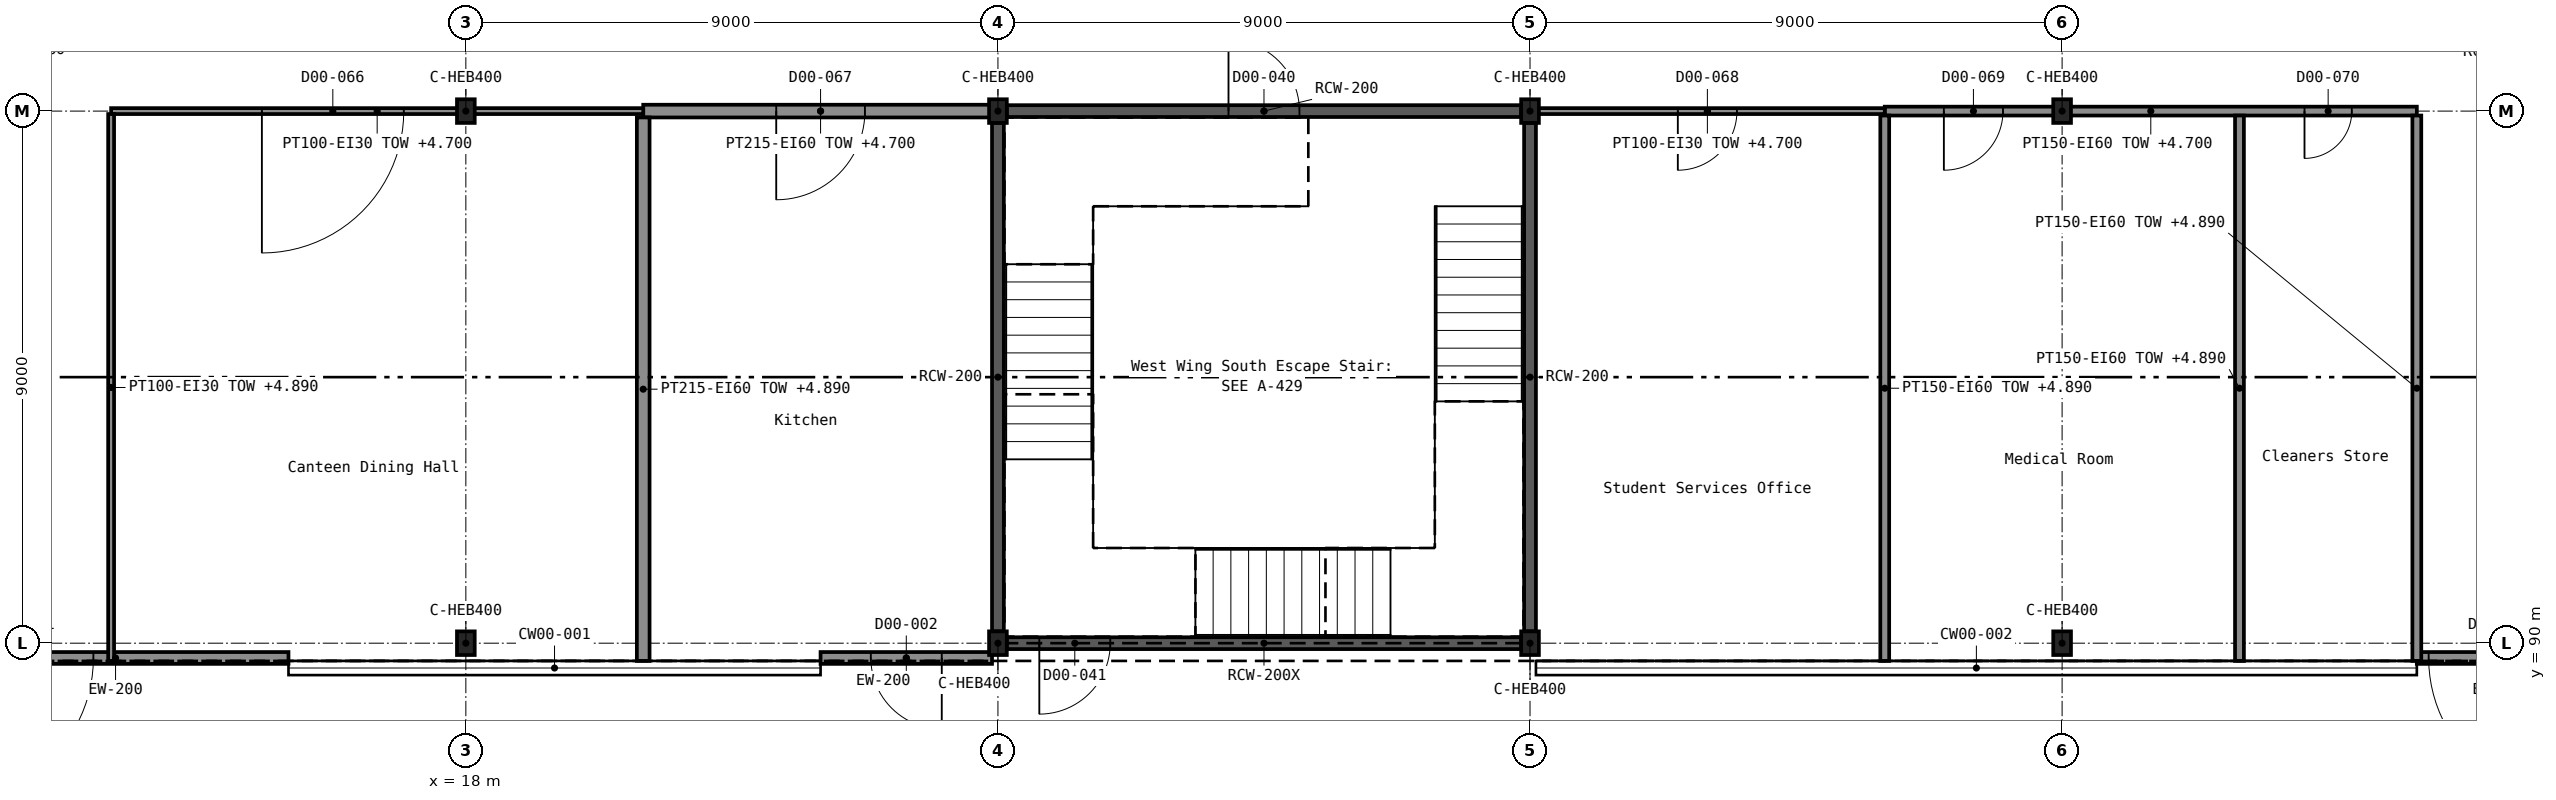
"""IFC4 building model, lengths in metres.
Left out: names, types, materials, properties, quantities, classifications, styles, units other than length and angle.
Written with IfcOpenShell. Run it as: python <this file> out.ifc"""

import sys

from ifc_helpers import new_model, si_unit, direction, frame, frame_2d, origin, origin_2d, place, context, subcontext, project, spatial, rectangle, i_section, extrude, element, fill, save


model = new_model("IFC4")
c1 = context("Model", 3, precision=1e-05, world=origin(), true_north=direction((0.0, 1.0)))
c2 = subcontext(c1, "Body", "Model", "MODEL_VIEW")
j1 = project(units=[si_unit("LENGTHUNIT", "METRE"), si_unit("PLANEANGLEUNIT", "RADIAN")], contexts=[c1])
p1 = place(None, origin())
s1 = spatial("IfcSite", under=j1, at=p1, CompositionType="ELEMENT")
p2 = place(p1, origin())
s2 = spatial("IfcBuilding", under=s1, at=p2, CompositionType="ELEMENT")
p3 = place(p2, origin())
s3 = spatial("IfcBuildingStorey", under=s2, at=p3, CompositionType="ELEMENT", Elevation=0.0)
for number, where, z_axis, x_axis in (
    (1, (18.0, 90.0, -0.3), (0.0, 0.0, 1.0), (1.0, 0.0, 0.0)),
    (2, (27.0, 90.0, -0.3), (0.0, 0.0, 1.0), (1.0, 0.0, 0.0)),
    (3, (36.0, 90.0, -0.3), (0.0, 0.0, 1.0), (1.0, 0.0, 0.0)),
    (4, (45.0, 90.0, -0.3), (0.0, 0.0, 1.0), (1.0, 0.0, 0.0)),
    (5, (18.0, 99.0, -0.3), (0.0, 0.0, 1.0), (1.0, 0.0, 0.0)),
    (6, (27.0, 99.0, -0.3), (0.0, 0.0, 1.0), (1.0, 0.0, 0.0)),
    (7, (36.0, 99.0, -0.3), (0.0, 0.0, 1.0), (1.0, 0.0, 0.0)),
    (8, (45.0, 99.0, -0.3), (0.0, 0.0, 1.0), (1.0, 0.0, 0.0)),
):
    element("IfcColumn", number, at=place(p3, frame(where, z_axis=z_axis, x_axis=x_axis)), inside=s3, PredefinedType="COLUMN", context=c2, shape_type="SweptSolid", body=[
        extrude(i_section(OverallWidth=0.3, OverallDepth=0.4, WebThickness=0.013, FlangeThickness=0.024, FilletRadius=0.027, at=origin_2d()), origin(), (0.0, 0.0, 1.0), 5.7),
    ])
p4 = place(p3, frame((9.15, 89.75, 0.0), z_axis=(0.0, 0.0, 1.0), x_axis=(1.0, 0.0, 0.0)))
e9 = element("IfcWall", 9, at=p4, inside=s3, PredefinedType="SOLIDWALL", context=c2, shape_type="SweptSolid", body=[
    extrude(rectangle(XDim=5.85, YDim=0.2, at=frame_2d((2.925, 0.0))), origin(), (0.0, 0.0, 1.0), 5.4),
])
p5 = place(p4, frame((0.15, 0.0, 0.0)))
e10 = element("IfcOpeningElement", 10, at=p5, cuts=e9, PredefinedType="OPENING", context=c2, shape_type="SweptSolid", body=[
    extrude(rectangle(XDim=2.4, YDim=2.4, at=frame_2d((1.2, 1.2))), frame((0.0, 0.111, 0.0), z_axis=(0.0, -1.0, 0.0), x_axis=(1.0, 0.0, 0.0)), (0.0, 0.0, 1.0), 0.222),
])
p6 = place(p3, frame((24.0, 89.75, 0.0), z_axis=(0.0, 0.0, 1.0), x_axis=(1.0, 0.0, 0.0)))
e11 = element("IfcWall", 11, at=p6, inside=s3, PredefinedType="SOLIDWALL", context=c2, shape_type="SweptSolid", body=[
    extrude(rectangle(XDim=2.9, YDim=0.2, at=frame_2d((1.45, 0.0))), origin(), (0.0, 0.0, 1.0), 5.4),
])
p7 = place(p6, frame((0.85, 0.0, 0.0)))
e12 = element("IfcOpeningElement", 12, at=p7, cuts=e11, PredefinedType="OPENING", context=c2, shape_type="SweptSolid", body=[
    extrude(rectangle(XDim=1.2, YDim=2.1, at=frame_2d((0.6, 1.05))), frame((0.0, 0.111, 0.0), z_axis=(0.0, -1.0, 0.0), x_axis=(1.0, 0.0, 0.0)), (0.0, 0.0, 1.0), 0.222),
])
p8 = place(p3, frame((51.0, 89.75, 0.0), z_axis=(0.0, 0.0, 1.0), x_axis=(1.0, 0.0, 0.0)))
e13 = element("IfcWall", 13, at=p8, inside=s3, PredefinedType="SOLIDWALL", context=c2, shape_type="SweptSolid", body=[
    extrude(rectangle(XDim=2.8, YDim=0.2, at=frame_2d((1.4, 0.0))), origin(), (0.0, 0.0, 1.0), 5.4),
])
p9 = place(p8, frame((0.2, 0.0, 0.0)))
e14 = element("IfcOpeningElement", 14, at=p9, cuts=e13, PredefinedType="OPENING", context=c2, shape_type="SweptSolid", body=[
    extrude(rectangle(XDim=2.4, YDim=2.4, at=frame_2d((1.2, 1.2))), frame((0.0, 0.111, 0.0), z_axis=(0.0, -1.0, 0.0), x_axis=(1.0, 0.0, 0.0)), (0.0, 0.0, 1.0), 0.222),
])
p10 = place(p3, frame((27.15, 90.0, 0.0), z_axis=(0.0, 0.0, 1.0), x_axis=(1.0, 0.0, 0.0)))
e15 = element("IfcWall", 15, at=p10, inside=s3, PredefinedType="SHEAR", context=c2, shape_type="SweptSolid", body=[
    extrude(rectangle(XDim=8.7, YDim=0.2, at=frame_2d((4.35, 0.0))), origin(), (0.0, 0.0, 1.0), 5.4),
])
p11 = place(p10, frame((0.55, 0.0, 0.0)))
e16 = element("IfcOpeningElement", 16, at=p11, cuts=e15, PredefinedType="OPENING", context=c2, shape_type="SweptSolid", body=[
    extrude(rectangle(XDim=1.2, YDim=2.1, at=frame_2d((0.6, 1.05))), frame((0.0, 0.111, 0.0), z_axis=(0.0, -1.0, 0.0), x_axis=(1.0, 0.0, 0.0)), (0.0, 0.0, 1.0), 0.222),
])
p12 = place(p3, frame((27.15, 99.0, 0.0), z_axis=(0.0, 0.0, 1.0), x_axis=(1.0, 0.0, 0.0)))
e17 = element("IfcWall", 17, at=p12, inside=s3, PredefinedType="SHEAR", context=c2, shape_type="SweptSolid", body=[
    extrude(rectangle(XDim=8.7, YDim=0.2, at=frame_2d((4.35, 0.0))), origin(), (0.0, 0.0, 1.0), 5.4),
])
p13 = place(p12, frame((3.75, 0.0, 0.0)))
e18 = element("IfcOpeningElement", 18, at=p13, cuts=e17, PredefinedType="OPENING", context=c2, shape_type="SweptSolid", body=[
    extrude(rectangle(XDim=1.2, YDim=2.1, at=frame_2d((0.6, 1.05))), frame((0.0, 0.111, 0.0), z_axis=(0.0, -1.0, 0.0), x_axis=(1.0, 0.0, 0.0)), (0.0, 0.0, 1.0), 0.222),
])
for number, where, z_axis, x_axis in (
    (19, (27.0, 90.2, 0.0), (0.0, 0.0, 1.0), (0.0, 1.0, 0.0)),
    (20, (36.0, 90.2, 0.0), (0.0, 0.0, 1.0), (0.0, 1.0, 0.0)),
):
    element("IfcWall", number, at=place(p3, frame(where, z_axis=z_axis, x_axis=x_axis)), inside=s3, PredefinedType="SHEAR", context=c2, shape_type="SweptSolid", body=[
        extrude(rectangle(XDim=8.6, YDim=0.2, at=frame_2d((4.3, 0.0))), origin(), (0.0, 0.0, 1.0), 5.4),
    ])
p14 = place(p3, frame((21.0, 99.0, 0.0), z_axis=(0.0, 0.0, 1.0), x_axis=(1.0, 0.0, 0.0)))
e21 = element("IfcWall", 21, at=p14, inside=s3, PredefinedType="PARTITIONING", context=c2, shape_type="SweptSolid", body=[
    extrude(rectangle(XDim=6.0, YDim=0.215, at=frame_2d((3.0, 0.0))), origin(), (0.0, 0.0, 1.0), 4.7),
])
p15 = place(p14, frame((2.25, 0.0, 0.0)))
e22 = element("IfcOpeningElement", 22, at=p15, cuts=e21, PredefinedType="OPENING", context=c2, shape_type="SweptSolid", body=[
    extrude(rectangle(XDim=1.5, YDim=2.1, at=frame_2d((0.75, 1.05))), frame((0.0, 0.119, 0.0), z_axis=(0.0, -1.0, 0.0), x_axis=(1.0, 0.0, 0.0)), (0.0, 0.0, 1.0), 0.237),
])
p16 = place(p3, frame((21.0, 89.7, 0.0), z_axis=(0.0, 0.0, 1.0), x_axis=(0.0, 1.0, 0.0)))
e23 = element("IfcWall", 23, at=p16, inside=s3, PredefinedType="PARTITIONING", context=c2, shape_type="SweptSolid", body=[
    extrude(rectangle(XDim=9.193, YDim=0.215, at=frame_2d((4.596, 0.0))), origin(), (0.0, 0.0, 1.0), 4.89),
])
p17 = place(p3, frame((42.0, 99.0, 0.0), z_axis=(0.0, 0.0, 1.0), x_axis=(1.0, 0.0, 0.0)))
e24 = element("IfcWall", 24, at=p17, inside=s3, PredefinedType="PARTITIONING", context=c2, shape_type="SweptSolid", body=[
    extrude(rectangle(XDim=9.0, YDim=0.15, at=frame_2d((4.5, 0.0))), origin(), (0.0, 0.0, 1.0), 4.7),
])
p18 = place(p17, frame((1.0, 0.0, 0.0)))
e25 = element("IfcOpeningElement", 25, at=p18, cuts=e24, PredefinedType="OPENING", context=c2, shape_type="SweptSolid", body=[
    extrude(rectangle(XDim=1.0, YDim=2.1, at=frame_2d((0.5, 1.05))), frame((0.0, 0.086, 0.0), z_axis=(0.0, -1.0, 0.0), x_axis=(1.0, 0.0, 0.0)), (0.0, 0.0, 1.0), 0.172),
])
p19 = place(p17, frame((7.1, 0.0, 0.0)))
e26 = element("IfcOpeningElement", 26, at=p19, cuts=e24, PredefinedType="OPENING", context=c2, shape_type="SweptSolid", body=[
    extrude(rectangle(XDim=0.8, YDim=2.1, at=frame_2d((0.4, 1.05))), frame((0.0, 0.086, 0.0), z_axis=(0.0, -1.0, 0.0), x_axis=(1.0, 0.0, 0.0)), (0.0, 0.0, 1.0), 0.172),
])
for number, where, z_axis, x_axis in (
    (27, (42.0, 89.7, 0.0), (0.0, 0.0, 1.0), (0.0, 1.0, 0.0)),
    (28, (48.0, 89.7, 0.0), (0.0, 0.0, 1.0), (0.0, 1.0, 0.0)),
    (29, (51.0, 89.7, 0.0), (0.0, 0.0, 1.0), (0.0, 1.0, 0.0)),
):
    element("IfcWall", number, at=place(p3, frame(where, z_axis=z_axis, x_axis=x_axis)), inside=s3, PredefinedType="PARTITIONING", context=c2, shape_type="SweptSolid", body=[
        extrude(rectangle(XDim=9.225, YDim=0.15, at=frame_2d((4.613, 0.0))), origin(), (0.0, 0.0, 1.0), 4.89),
    ])
p20 = place(p3, frame((12.0, 99.0, 0.0), z_axis=(0.0, 0.0, 1.0), x_axis=(1.0, 0.0, 0.0)))
e30 = element("IfcWall", 30, at=p20, inside=s3, PredefinedType="PARTITIONING", context=c2, shape_type="SweptSolid", body=[
    extrude(rectangle(XDim=9.0, YDim=0.1, at=frame_2d((4.5, 0.0))), origin(), (0.0, 0.0, 1.0), 4.7),
])
p21 = place(p20, frame((2.55, 0.0, 0.0)))
e31 = element("IfcOpeningElement", 31, at=p21, cuts=e30, PredefinedType="OPENING", context=c2, shape_type="SweptSolid", body=[
    extrude(rectangle(XDim=2.4, YDim=2.1, at=frame_2d((1.2, 1.05))), frame((0.0, 0.061, 0.0), z_axis=(0.0, -1.0, 0.0), x_axis=(1.0, 0.0, 0.0)), (0.0, 0.0, 1.0), 0.122),
])
p22 = place(p3, frame((36.0, 99.0, 0.0), z_axis=(0.0, 0.0, 1.0), x_axis=(1.0, 0.0, 0.0)))
e32 = element("IfcWall", 32, at=p22, inside=s3, PredefinedType="PARTITIONING", context=c2, shape_type="SweptSolid", body=[
    extrude(rectangle(XDim=6.0, YDim=0.1, at=frame_2d((3.0, 0.0))), origin(), (0.0, 0.0, 1.0), 4.7),
])
p23 = place(p22, frame((2.5, 0.0, 0.0)))
e33 = element("IfcOpeningElement", 33, at=p23, cuts=e32, PredefinedType="OPENING", context=c2, shape_type="SweptSolid", body=[
    extrude(rectangle(XDim=1.0, YDim=2.1, at=frame_2d((0.5, 1.05))), frame((0.0, 0.061, 0.0), z_axis=(0.0, -1.0, 0.0), x_axis=(1.0, 0.0, 0.0)), (0.0, 0.0, 1.0), 0.122),
])
p24 = place(p3, frame((12.0, 89.7, 0.0), z_axis=(0.0, 0.0, 1.0), x_axis=(0.0, 1.0, 0.0)))
e34 = element("IfcWall", 34, at=p24, inside=s3, PredefinedType="PARTITIONING", context=c2, shape_type="SweptSolid", body=[
    extrude(rectangle(XDim=9.25, YDim=0.1, at=frame_2d((4.625, 0.0))), origin(), (0.0, 0.0, 1.0), 4.89),
])
p25 = place(p5, frame((2.4, 0.0, 0.0), z_axis=(0.0, 0.0, 1.0), x_axis=(-1.0, 0.0, 0.0)))
e35 = element("IfcDoor", 35, at=p25, inside=s3, OperationType="DOUBLE_DOOR_DOUBLE_SWING", PredefinedType="DOOR", context=c2, shape_type="SweptSolid", body=[
    extrude(rectangle(XDim=2.4, YDim=2.4, at=frame_2d((1.2, 1.2))), frame((0.0, 0.025, 0.0), z_axis=(0.0, -1.0, 0.0), x_axis=(1.0, 0.0, 0.0)), (0.0, 0.0, 1.0), 0.05),
])
fill(e10, e35)
p26 = place(p7, frame((1.2, 0.0, 0.0), z_axis=(0.0, 0.0, 1.0), x_axis=(-1.0, 0.0, 0.0)))
e36 = element("IfcDoor", 36, at=p26, inside=s3, OperationType="SINGLE_SWING_LEFT", PredefinedType="DOOR", context=c2, shape_type="SweptSolid", body=[
    extrude(rectangle(XDim=1.2, YDim=2.1, at=frame_2d((0.6, 1.05))), frame((0.0, 0.025, 0.0), z_axis=(0.0, -1.0, 0.0), x_axis=(1.0, 0.0, 0.0)), (0.0, 0.0, 1.0), 0.05),
])
fill(e12, e36)
p27 = place(p9, frame((2.4, 0.0, 0.0), z_axis=(0.0, 0.0, 1.0), x_axis=(-1.0, 0.0, 0.0)))
e37 = element("IfcDoor", 37, at=p27, inside=s3, OperationType="DOUBLE_DOOR_DOUBLE_SWING", PredefinedType="DOOR", context=c2, shape_type="SweptSolid", body=[
    extrude(rectangle(XDim=2.4, YDim=2.4, at=frame_2d((1.2, 1.2))), frame((0.0, 0.025, 0.0), z_axis=(0.0, -1.0, 0.0), x_axis=(1.0, 0.0, 0.0)), (0.0, 0.0, 1.0), 0.05),
])
fill(e14, e37)
p28 = place(p13, origin())
e38 = element("IfcDoor", 38, at=p28, inside=s3, OperationType="SINGLE_SWING_LEFT", PredefinedType="DOOR", context=c2, shape_type="SweptSolid", body=[
    extrude(rectangle(XDim=1.2, YDim=2.1, at=frame_2d((0.6, 1.05))), frame((0.0, 0.025, 0.0), z_axis=(0.0, -1.0, 0.0), x_axis=(1.0, 0.0, 0.0)), (0.0, 0.0, 1.0), 0.05),
])
fill(e18, e38)
p29 = place(p11, frame((1.2, 0.0, 0.0), z_axis=(0.0, 0.0, 1.0), x_axis=(-1.0, 0.0, 0.0)))
e39 = element("IfcDoor", 39, at=p29, inside=s3, OperationType="SINGLE_SWING_RIGHT", PredefinedType="DOOR", context=c2, shape_type="SweptSolid", body=[
    extrude(rectangle(XDim=1.2, YDim=2.1, at=frame_2d((0.6, 1.05))), frame((0.0, 0.025, 0.0), z_axis=(0.0, -1.0, 0.0), x_axis=(1.0, 0.0, 0.0)), (0.0, 0.0, 1.0), 0.05),
])
fill(e16, e39)
p30 = place(p21, frame((2.4, 0.0, 0.0), z_axis=(0.0, 0.0, 1.0), x_axis=(-1.0, 0.0, 0.0)))
e40 = element("IfcDoor", 40, at=p30, inside=s3, OperationType="DOUBLE_DOOR_SINGLE_SWING", PredefinedType="DOOR", context=c2, shape_type="SweptSolid", body=[
    extrude(rectangle(XDim=2.4, YDim=2.1, at=frame_2d((1.2, 1.05))), frame((0.0, 0.025, 0.0), z_axis=(0.0, -1.0, 0.0), x_axis=(1.0, 0.0, 0.0)), (0.0, 0.0, 1.0), 0.05),
])
fill(e31, e40)
p31 = place(p15, frame((1.5, 0.0, 0.0), z_axis=(0.0, 0.0, 1.0), x_axis=(-1.0, 0.0, 0.0)))
e41 = element("IfcDoor", 41, at=p31, inside=s3, OperationType="DOUBLE_DOOR_SINGLE_SWING", PredefinedType="DOOR", context=c2, shape_type="SweptSolid", body=[
    extrude(rectangle(XDim=1.5, YDim=2.1, at=frame_2d((0.75, 1.05))), frame((0.0, 0.025, 0.0), z_axis=(0.0, -1.0, 0.0), x_axis=(1.0, 0.0, 0.0)), (0.0, 0.0, 1.0), 0.05),
])
fill(e22, e41)
p32 = place(p23, frame((1.0, 0.0, 0.0), z_axis=(0.0, 0.0, 1.0), x_axis=(-1.0, 0.0, 0.0)))
e42 = element("IfcDoor", 42, at=p32, inside=s3, OperationType="SINGLE_SWING_RIGHT", PredefinedType="DOOR", context=c2, shape_type="SweptSolid", body=[
    extrude(rectangle(XDim=1.0, YDim=2.1, at=frame_2d((0.5, 1.05))), frame((0.0, 0.025, 0.0), z_axis=(0.0, -1.0, 0.0), x_axis=(1.0, 0.0, 0.0)), (0.0, 0.0, 1.0), 0.05),
])
fill(e33, e42)
p33 = place(p18, frame((1.0, 0.0, 0.0), z_axis=(0.0, 0.0, 1.0), x_axis=(-1.0, 0.0, 0.0)))
e43 = element("IfcDoor", 43, at=p33, inside=s3, OperationType="SINGLE_SWING_RIGHT", PredefinedType="DOOR", context=c2, shape_type="SweptSolid", body=[
    extrude(rectangle(XDim=1.0, YDim=2.1, at=frame_2d((0.5, 1.05))), frame((0.0, 0.025, 0.0), z_axis=(0.0, -1.0, 0.0), x_axis=(1.0, 0.0, 0.0)), (0.0, 0.0, 1.0), 0.05),
])
fill(e25, e43)
p34 = place(p19, frame((0.8, 0.0, 0.0), z_axis=(0.0, 0.0, 1.0), x_axis=(-1.0, 0.0, 0.0)))
e44 = element("IfcDoor", 44, at=p34, inside=s3, OperationType="SINGLE_SWING_RIGHT", PredefinedType="DOOR", context=c2, shape_type="SweptSolid", body=[
    extrude(rectangle(XDim=0.8, YDim=2.1, at=frame_2d((0.4, 1.05))), frame((0.0, 0.025, 0.0), z_axis=(0.0, -1.0, 0.0), x_axis=(1.0, 0.0, 0.0)), (0.0, 0.0, 1.0), 0.05),
])
fill(e26, e44)
save(model, sys.argv[1])
